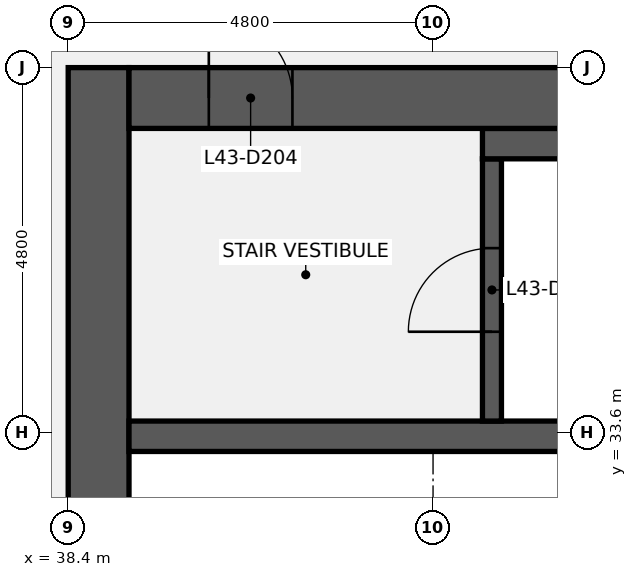
"""IFC4 building model, lengths in metres.
Left out: names, types, materials, properties, quantities, classifications, styles, units other than length and angle.
Written with IfcOpenShell. Run it as: python <this file> out.ifc"""

import sys

from ifc_helpers import new_model, si_unit, direction, frame, frame_2d, origin, place, context, subcontext, project, spatial, rectangle, extrude, element, fill, save


model = new_model("IFC4")
c1 = context("Model", 3, precision=1e-05, world=origin(), true_north=direction((0.0, 1.0)))
c2 = subcontext(c1, "Body", "Model", "MODEL_VIEW")
j1 = project(units=[si_unit("LENGTHUNIT", "METRE"), si_unit("PLANEANGLEUNIT", "RADIAN")], contexts=[c1])
p1 = place(None, origin())
s1 = spatial("IfcSite", under=j1, at=p1, CompositionType="ELEMENT")
p2 = place(p1, origin())
s2 = spatial("IfcBuilding", under=s1, at=p2, CompositionType="ELEMENT")
p3 = place(p2, frame((0.0, 0.0, 201.2)))
s3 = spatial("IfcBuildingStorey", under=s2, at=p3, CompositionType="ELEMENT", Elevation=201.2)
p4 = place(p3, frame((38.8, 9.6, 0.0), z_axis=(0.0, 0.0, 1.0), x_axis=(0.0, 1.0, 0.0)))
e1 = element("IfcWall", 1, at=p4, inside=s3, PredefinedType="SHEAR", context=c2, shape_type="SweptSolid", body=[
    extrude(rectangle(XDim=28.8, YDim=0.8, at=frame_2d((14.4, 0.0))), origin(), (0.0, 0.0, 1.0), 3.84),
])
p5 = place(p4, frame((8.7, 0.0, 0.0)))
e2 = element("IfcOpeningElement", 2, at=p5, cuts=e1, PredefinedType="OPENING", context=c2, shape_type="SweptSolid", body=[
    extrude(rectangle(XDim=1.8, YDim=2.1, at=frame_2d((0.9, 1.05))), frame((0.0, 0.41, 0.0), z_axis=(0.0, -1.0, 0.0), x_axis=(1.0, 0.0, 0.0)), (0.0, 0.0, 1.0), 0.82),
])
p6 = place(p4, frame((18.3, 0.0, 0.0)))
e3 = element("IfcOpeningElement", 3, at=p6, cuts=e1, PredefinedType="OPENING", context=c2, shape_type="SweptSolid", body=[
    extrude(rectangle(XDim=1.8, YDim=2.1, at=frame_2d((0.9, 1.05))), frame((0.0, 0.41, 0.0), z_axis=(0.0, -1.0, 0.0), x_axis=(1.0, 0.0, 0.0)), (0.0, 0.0, 1.0), 0.82),
])
p7 = place(p3, frame((39.2, 33.55, 0.0), z_axis=(0.0, 0.0, 1.0), x_axis=(1.0, 0.0, 0.0)))
e4 = element("IfcWall", 4, at=p7, inside=s3, PredefinedType="SHEAR", context=c2, shape_type="SweptSolid", body=[
    extrude(rectangle(XDim=17.6, YDim=0.4, at=frame_2d((8.8, 0.0))), origin(), (0.0, 0.0, 1.0), 3.84),
])
p8 = place(p3, frame((43.975, 33.75, 0.0), z_axis=(0.0, 0.0, 1.0), x_axis=(0.0, 1.0, 0.0)))
e5 = element("IfcWall", 5, at=p8, inside=s3, PredefinedType="SHEAR", context=c2, shape_type="SweptSolid", body=[
    extrude(rectangle(XDim=3.45, YDim=0.25, at=frame_2d((1.725, 0.0))), origin(), (0.0, 0.0, 1.0), 3.84),
])
p9 = place(p8, frame((1.175, 0.0, 0.0)))
e6 = element("IfcOpeningElement", 6, at=p9, cuts=e5, PredefinedType="OPENING", context=c2, shape_type="SweptSolid", body=[
    extrude(rectangle(XDim=1.1, YDim=2.1, at=frame_2d((0.55, 1.05))), frame((0.0, 0.135, 0.0), z_axis=(0.0, -1.0, 0.0), x_axis=(1.0, 0.0, 0.0)), (0.0, 0.0, 1.0), 0.27),
])
p10 = place(p3, frame((43.85, 37.4, 0.0), z_axis=(0.0, 0.0, 1.0), x_axis=(1.0, 0.0, 0.0)))
e7 = element("IfcWall", 7, at=p10, inside=s3, PredefinedType="SHEAR", context=c2, shape_type="SweptSolid", body=[
    extrude(rectangle(XDim=4.15, YDim=0.4, at=frame_2d((2.075, 0.0))), origin(), (0.0, 0.0, 1.0), 3.84),
])
p11 = place(p3, frame((39.2, 38.0, 0.0), z_axis=(0.0, 0.0, 1.0), x_axis=(1.0, 0.0, 0.0)))
e8 = element("IfcWall", 8, at=p11, inside=s3, PredefinedType="SHEAR", context=c2, shape_type="SweptSolid", body=[
    extrude(rectangle(XDim=8.8, YDim=0.8, at=frame_2d((4.4, 0.0))), origin(), (0.0, 0.0, 1.0), 3.84),
])
p12 = place(p11, frame((1.05, 0.0, 0.0)))
e9 = element("IfcOpeningElement", 9, at=p12, cuts=e8, PredefinedType="OPENING", context=c2, shape_type="SweptSolid", body=[
    extrude(rectangle(XDim=1.1, YDim=2.1, at=frame_2d((0.55, 1.05))), frame((0.0, 0.41, 0.0), z_axis=(0.0, -1.0, 0.0), x_axis=(1.0, 0.0, 0.0)), (0.0, 0.0, 1.0), 0.82),
])
p13 = place(p9, origin())
e10 = element("IfcDoor", 10, at=p13, inside=s3, OperationType="SINGLE_SWING_LEFT", PredefinedType="DOOR", context=c2, shape_type="SweptSolid", body=[
    extrude(rectangle(XDim=1.1, YDim=2.1, at=frame_2d((0.55, 1.05))), frame((0.0, 0.025, 0.0), z_axis=(0.0, -1.0, 0.0), x_axis=(1.0, 0.0, 0.0)), (0.0, 0.0, 1.0), 0.05),
])
fill(e6, e10)
p14 = place(p12, origin())
e11 = element("IfcDoor", 11, at=p14, inside=s3, OperationType="SINGLE_SWING_LEFT", PredefinedType="DOOR", context=c2, shape_type="SweptSolid", body=[
    extrude(rectangle(XDim=1.1, YDim=2.1, at=frame_2d((0.55, 1.05))), frame((0.0, 0.025, 0.0), z_axis=(0.0, -1.0, 0.0), x_axis=(1.0, 0.0, 0.0)), (0.0, 0.0, 1.0), 0.05),
])
fill(e9, e11)
save(model, sys.argv[1])
